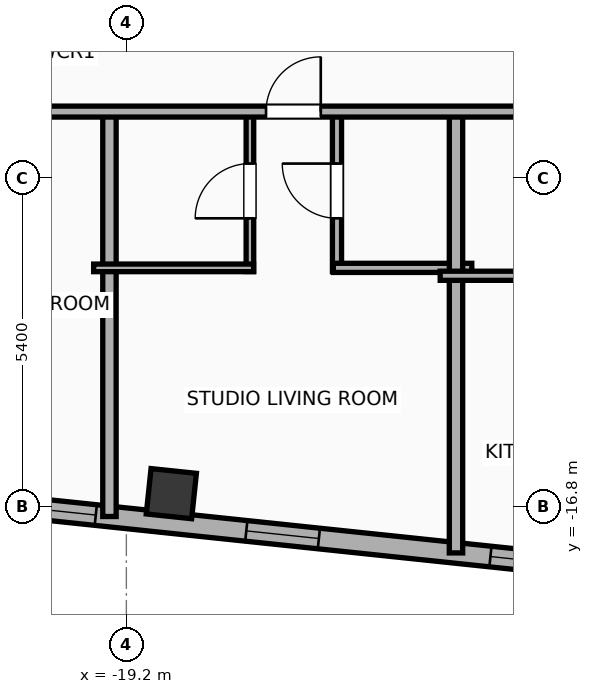
"""IFC4 building model, lengths in metres.
Left out: names, types, materials, properties, quantities, classifications, styles, units other than length and angle.
Written with IfcOpenShell. Run it as: python <this file> out.ifc"""

import sys

from ifc_helpers import new_model, si_unit, direction, frame, frame_2d, origin, origin_2d, place, context, subcontext, project, spatial, rectangle, hollow_rectangle, extrude, element, fill, save


model = new_model("IFC4")
c1 = context("Model", 3, precision=1e-05, world=origin(), true_north=direction((0.0, 1.0)))
c2 = subcontext(c1, "Body", "Model", "MODEL_VIEW")
j1 = project(units=[si_unit("LENGTHUNIT", "METRE"), si_unit("PLANEANGLEUNIT", "RADIAN")], contexts=[c1])
p1 = place(None, origin())
s1 = spatial("IfcSite", under=j1, at=p1, CompositionType="ELEMENT")
p2 = place(p1, origin())
s2 = spatial("IfcBuilding", under=s1, at=p2, CompositionType="ELEMENT")
p3 = place(p2, frame((0.0, 0.0, 267.8)))
s3 = spatial("IfcBuildingStorey", under=s2, at=p3, CompositionType="ELEMENT", Elevation=267.8)
p4 = place(p3, frame((-18.46, -16.583, 0.0), z_axis=(0.0, 0.0, 1.0), x_axis=(0.994521895368, -0.104528463268, 0.0)))
e1 = element("IfcColumn", 1, at=p4, inside=s3, PredefinedType="COLUMN", context=c2, shape_type="SweptSolid", body=[
    extrude(hollow_rectangle(XDim=0.75, YDim=0.75, WallThickness=0.025, at=origin_2d()), origin(), (0.0, 0.0, 1.0), 3.9),
])
p5 = place(p3, frame((18.708, -20.972, 0.0), z_axis=(0.0, 0.0, 1.0), x_axis=(-0.994521888554, 0.104528528102, 0.0)))
e2 = element("IfcWall", 2, at=p5, inside=s3, PredefinedType="ELEMENTEDWALL", context=c2, shape_type="SweptSolid", body=[
    extrude(rectangle(XDim=46.766, YDim=0.34, at=frame_2d((23.383, 0.0))), origin(), (0.0, 0.0, 1.0), 3.65),
])
p6 = place(p5, frame((23.833, 0.0, 0.75)))
e3 = element("IfcOpeningElement", 3, at=p6, cuts=e2, PredefinedType="OPENING", context=c2, shape_type="SweptSolid", body=[
    extrude(rectangle(XDim=2.4, YDim=2.1, at=frame_2d((1.2, 1.05))), frame((0.0, 0.18, 0.0), z_axis=(0.0, -1.0, 0.0), x_axis=(1.0, 0.0, 0.0)), (0.0, 0.0, 1.0), 0.36),
])
p7 = place(p5, frame((38.622, 0.0, 0.75)))
e4 = element("IfcOpeningElement", 4, at=p7, cuts=e2, PredefinedType="OPENING", context=c2, shape_type="SweptSolid", body=[
    extrude(rectangle(XDim=2.4, YDim=2.1, at=frame_2d((1.2, 1.05))), frame((0.0, 0.18, 0.0), z_axis=(0.0, -1.0, 0.0), x_axis=(1.0, 0.0, 0.0)), (0.0, 0.0, 1.0), 0.36),
])
p8 = place(p5, frame((44.402, 0.0, 0.75)))
e5 = element("IfcOpeningElement", 5, at=p8, cuts=e2, PredefinedType="OPENING", context=c2, shape_type="SweptSolid", body=[
    extrude(rectangle(XDim=1.2, YDim=2.05, at=frame_2d((0.6, 1.025))), frame((0.0, 0.18, 0.0), z_axis=(0.0, -1.0, 0.0), x_axis=(1.0, 0.0, 0.0)), (0.0, 0.0, 1.0), 0.36),
])
p9 = place(p5, frame((42.406, 0.0, 0.75)))
e6 = element("IfcOpeningElement", 6, at=p9, cuts=e2, PredefinedType="OPENING", context=c2, shape_type="SweptSolid", body=[
    extrude(rectangle(XDim=1.2, YDim=2.05, at=frame_2d((0.6, 1.025))), frame((0.0, 0.18, 0.0), z_axis=(0.0, -1.0, 0.0), x_axis=(1.0, 0.0, 0.0)), (0.0, 0.0, 1.0), 0.36),
])
p10 = place(p5, frame((34.933, 0.0, 0.75)))
e7 = element("IfcOpeningElement", 7, at=p10, cuts=e2, PredefinedType="OPENING", context=c2, shape_type="SweptSolid", body=[
    extrude(rectangle(XDim=1.2, YDim=2.05, at=frame_2d((0.6, 1.025))), frame((0.0, 0.18, 0.0), z_axis=(0.0, -1.0, 0.0), x_axis=(1.0, 0.0, 0.0)), (0.0, 0.0, 1.0), 0.36),
])
p11 = place(p5, frame((28.631, 0.0, 0.75)))
e8 = element("IfcOpeningElement", 8, at=p11, cuts=e2, PredefinedType="OPENING", context=c2, shape_type="SweptSolid", body=[
    extrude(rectangle(XDim=1.2, YDim=2.05, at=frame_2d((0.6, 1.025))), frame((0.0, 0.18, 0.0), z_axis=(0.0, -1.0, 0.0), x_axis=(1.0, 0.0, 0.0)), (0.0, 0.0, 1.0), 0.36),
])
p12 = place(p5, frame((30.896, 0.0, 0.75)))
e9 = element("IfcOpeningElement", 9, at=p12, cuts=e2, PredefinedType="OPENING", context=c2, shape_type="SweptSolid", body=[
    extrude(rectangle(XDim=1.2, YDim=2.05, at=frame_2d((0.6, 1.025))), frame((0.0, 0.18, 0.0), z_axis=(0.0, -1.0, 0.0), x_axis=(1.0, 0.0, 0.0)), (0.0, 0.0, 1.0), 0.36),
])
p13 = place(p5, frame((7.497, 0.0, 0.75)))
e10 = element("IfcOpeningElement", 10, at=p13, cuts=e2, PredefinedType="OPENING", context=c2, shape_type="SweptSolid", body=[
    extrude(rectangle(XDim=1.2, YDim=2.05, at=frame_2d((0.6, 1.025))), frame((0.0, 0.18, 0.0), z_axis=(0.0, -1.0, 0.0), x_axis=(1.0, 0.0, 0.0)), (0.0, 0.0, 1.0), 0.36),
])
p14 = place(p5, frame((4.151, 0.0, 0.75)))
e11 = element("IfcOpeningElement", 11, at=p14, cuts=e2, PredefinedType="OPENING", context=c2, shape_type="SweptSolid", body=[
    extrude(rectangle(XDim=1.2, YDim=2.05, at=frame_2d((0.6, 1.025))), frame((0.0, 0.18, 0.0), z_axis=(0.0, -1.0, 0.0), x_axis=(1.0, 0.0, 0.0)), (0.0, 0.0, 1.0), 0.36),
])
p15 = place(p5, frame((1.365, 0.0, 0.75)))
e12 = element("IfcOpeningElement", 12, at=p15, cuts=e2, PredefinedType="OPENING", context=c2, shape_type="SweptSolid", body=[
    extrude(rectangle(XDim=1.2, YDim=2.05, at=frame_2d((0.6, 1.025))), frame((0.0, 0.18, 0.0), z_axis=(0.0, -1.0, 0.0), x_axis=(1.0, 0.0, 0.0)), (0.0, 0.0, 1.0), 0.36),
])
p16 = place(p5, frame((20.254, 0.0, 0.75)))
e13 = element("IfcOpeningElement", 13, at=p16, cuts=e2, PredefinedType="OPENING", context=c2, shape_type="SweptSolid", body=[
    extrude(rectangle(XDim=1.2, YDim=2.05, at=frame_2d((0.6, 1.025))), frame((0.0, 0.18, 0.0), z_axis=(0.0, -1.0, 0.0), x_axis=(1.0, 0.0, 0.0)), (0.0, 0.0, 1.0), 0.36),
])
p17 = place(p5, frame((16.172, 0.0, 0.75)))
e14 = element("IfcOpeningElement", 14, at=p17, cuts=e2, PredefinedType="OPENING", context=c2, shape_type="SweptSolid", body=[
    extrude(rectangle(XDim=1.2, YDim=2.05, at=frame_2d((0.6, 1.025))), frame((0.0, 0.18, 0.0), z_axis=(0.0, -1.0, 0.0), x_axis=(1.0, 0.0, 0.0)), (0.0, 0.0, 1.0), 0.36),
])
p18 = place(p5, frame((12.11, 0.0, 0.75)))
e15 = element("IfcOpeningElement", 15, at=p18, cuts=e2, PredefinedType="OPENING", context=c2, shape_type="SweptSolid", body=[
    extrude(rectangle(XDim=1.2, YDim=2.05, at=frame_2d((0.6, 1.025))), frame((0.0, 0.18, 0.0), z_axis=(0.0, -1.0, 0.0), x_axis=(1.0, 0.0, 0.0)), (0.0, 0.0, 1.0), 0.36),
])
p19 = place(p3, frame((-19.478, -16.959, 0.0), z_axis=(0.0, 0.0, 1.0), x_axis=(0.0, 1.0, 0.0)))
e16 = element("IfcWall", 16, at=p19, inside=s3, PredefinedType="PARTITIONING", context=c2, shape_type="SweptSolid", body=[
    extrude(rectangle(XDim=6.739, YDim=0.22, at=frame_2d((3.369, 0.0))), origin(), (0.0, 0.0, 1.0), 3.65),
])
p20 = place(p3, frame((-17.168, -12.93, 0.0), z_axis=(0.0, 0.0, 1.0), x_axis=(0.0, 1.0, 0.0)))
e17 = element("IfcWall", 17, at=p20, inside=s3, PredefinedType="PARTITIONING", context=c2, shape_type="SweptSolid", body=[
    extrude(rectangle(XDim=2.65, YDim=0.125, at=frame_2d((1.325, 0.0))), origin(), (0.0, 0.0, 1.0), 3.65),
])
p21 = place(p20, frame((0.875, 0.0, 0.0)))
e18 = element("IfcOpeningElement", 18, at=p21, cuts=e17, PredefinedType="OPENING", context=c2, shape_type="SweptSolid", body=[
    extrude(rectangle(XDim=0.9, YDim=2.05, at=frame_2d((0.45, 1.025))), frame((0.0, 0.073, 0.0), z_axis=(0.0, -1.0, 0.0), x_axis=(1.0, 0.0, 0.0)), (0.0, 0.0, 1.0), 0.145),
])
p22 = place(p3, frame((-15.736, -12.93, 0.0), z_axis=(0.0, 0.0, 1.0), x_axis=(0.0, 1.0, 0.0)))
e19 = element("IfcWall", 19, at=p22, inside=s3, PredefinedType="PLUMBINGWALL", context=c2, shape_type="SweptSolid", body=[
    extrude(rectangle(XDim=2.65, YDim=0.15, at=frame_2d((1.325, 0.0))), origin(), (0.0, 0.0, 1.0), 3.65),
])
p23 = place(p22, frame((0.875, 0.0, 0.0)))
e20 = element("IfcOpeningElement", 20, at=p23, cuts=e19, PredefinedType="OPENING", context=c2, shape_type="SweptSolid", body=[
    extrude(rectangle(XDim=0.9, YDim=2.05, at=frame_2d((0.45, 1.025))), frame((0.0, 0.085, 0.0), z_axis=(0.0, -1.0, 0.0), x_axis=(1.0, 0.0, 0.0)), (0.0, 0.0, 1.0), 0.17),
])
p24 = place(p3, frame((-19.738, -12.87, 0.0), z_axis=(0.0, 0.0, 1.0), x_axis=(1.0, 0.0, 0.0)))
e21 = element("IfcWall", 21, at=p24, inside=s3, PredefinedType="PARTITIONING", context=c2, shape_type="SweptSolid", body=[
    extrude(rectangle(XDim=2.63, YDim=0.125, at=frame_2d((1.315, 0.0))), origin(), (0.0, 0.0, 1.0), 3.65),
])
p25 = place(p3, frame((-15.796, -12.87, 0.0), z_axis=(0.0, 0.0, 1.0), x_axis=(1.0, 0.0, 0.0)))
e22 = element("IfcWall", 22, at=p25, inside=s3, PredefinedType="PLUMBINGWALL", context=c2, shape_type="SweptSolid", body=[
    extrude(rectangle(XDim=2.277, YDim=0.15, at=frame_2d((1.138, 0.0))), origin(), (0.0, 0.0, 1.0), 3.65),
])
p26 = place(p3, frame((-13.779, -17.558, 0.0), z_axis=(0.0, 0.0, 1.0), x_axis=(0.0, 1.0, 0.0)))
e23 = element("IfcWall", 23, at=p26, inside=s3, PredefinedType="PARTITIONING", context=c2, shape_type="SweptSolid", body=[
    extrude(rectangle(XDim=7.338, YDim=0.22, at=frame_2d((3.669, 0.0))), origin(), (0.0, 0.0, 1.0), 3.65),
])
p27 = place(p3, frame((-14.039, -13.0, 0.0), z_axis=(0.0, 0.0, 1.0), x_axis=(1.0, 0.0, 0.0)))
e24 = element("IfcWall", 24, at=p27, inside=s3, PredefinedType="PLUMBINGWALL", context=c2, shape_type="SweptSolid", body=[
    extrude(rectangle(XDim=2.671, YDim=0.15, at=frame_2d((1.335, 0.0))), origin(), (0.0, 0.0, 1.0), 3.65),
])
p28 = place(p3, frame((-30.66, -10.3, 0.0), z_axis=(0.0, 0.0, 1.0), x_axis=(1.0, 0.0, 0.0)))
e25 = element("IfcWall", 25, at=p28, inside=s3, PredefinedType="PARTITIONING", context=c2, shape_type="SweptSolid", body=[
    extrude(rectangle(XDim=22.58, YDim=0.18, at=frame_2d((11.29, 0.0))), origin(), (0.0, 0.0, 1.0), 3.65),
])
p29 = place(p28, frame((2.318, 0.0, 0.0)))
e26 = element("IfcOpeningElement", 26, at=p29, cuts=e25, PredefinedType="OPENING", context=c2, shape_type="SweptSolid", body=[
    extrude(rectangle(XDim=0.9, YDim=2.05, at=frame_2d((0.45, 1.025))), frame((0.0, 0.1, 0.0), z_axis=(0.0, -1.0, 0.0), x_axis=(1.0, 0.0, 0.0)), (0.0, 0.0, 1.0), 0.2),
])
p30 = place(p28, frame((8.845, 0.0, 0.0)))
e27 = element("IfcOpeningElement", 27, at=p30, cuts=e25, PredefinedType="OPENING", context=c2, shape_type="SweptSolid", body=[
    extrude(rectangle(XDim=1.15, YDim=2.05, at=frame_2d((0.575, 1.025))), frame((0.0, 0.1, 0.0), z_axis=(0.0, -1.0, 0.0), x_axis=(1.0, 0.0, 0.0)), (0.0, 0.0, 1.0), 0.2),
])
p31 = place(p28, frame((13.758, 0.0, 0.0)))
e28 = element("IfcOpeningElement", 28, at=p31, cuts=e25, PredefinedType="OPENING", context=c2, shape_type="SweptSolid", body=[
    extrude(rectangle(XDim=0.9, YDim=2.05, at=frame_2d((0.45, 1.025))), frame((0.0, 0.1, 0.0), z_axis=(0.0, -1.0, 0.0), x_axis=(1.0, 0.0, 0.0)), (0.0, 0.0, 1.0), 0.2),
])
p32 = place(p28, frame((20.292, 0.0, 0.0)))
e29 = element("IfcOpeningElement", 29, at=p32, cuts=e25, PredefinedType="OPENING", context=c2, shape_type="SweptSolid", body=[
    extrude(rectangle(XDim=1.15, YDim=2.05, at=frame_2d((0.575, 1.025))), frame((0.0, 0.1, 0.0), z_axis=(0.0, -1.0, 0.0), x_axis=(1.0, 0.0, 0.0)), (0.0, 0.0, 1.0), 0.2),
])
p33 = place(p7, origin())
e30 = element("IfcWindow", 30, at=p33, inside=s3, PartitioningType="SINGLE_PANEL", PredefinedType="WINDOW", context=c2, shape_type="SweptSolid", body=[
    extrude(rectangle(XDim=2.4, YDim=2.1, at=frame_2d((1.2, 1.05))), frame((0.0, 0.03, 0.0), z_axis=(0.0, -1.0, 0.0), x_axis=(1.0, 0.0, 0.0)), (0.0, 0.0, 1.0), 0.06),
])
fill(e4, e30)
p34 = place(p10, origin())
e31 = element("IfcWindow", 31, at=p34, inside=s3, PartitioningType="SINGLE_PANEL", PredefinedType="WINDOW", context=c2, shape_type="SweptSolid", body=[
    extrude(rectangle(XDim=1.2, YDim=2.05, at=frame_2d((0.6, 1.025))), frame((0.0, 0.03, 0.0), z_axis=(0.0, -1.0, 0.0), x_axis=(1.0, 0.0, 0.0)), (0.0, 0.0, 1.0), 0.06),
])
fill(e7, e31)
p35 = place(p12, origin())
e32 = element("IfcWindow", 32, at=p35, inside=s3, PartitioningType="SINGLE_PANEL", PredefinedType="WINDOW", context=c2, shape_type="SweptSolid", body=[
    extrude(rectangle(XDim=1.2, YDim=2.05, at=frame_2d((0.6, 1.025))), frame((0.0, 0.03, 0.0), z_axis=(0.0, -1.0, 0.0), x_axis=(1.0, 0.0, 0.0)), (0.0, 0.0, 1.0), 0.06),
])
fill(e9, e32)
p36 = place(p21, origin())
e33 = element("IfcDoor", 33, at=p36, inside=s3, OperationType="SINGLE_SWING_LEFT", PredefinedType="DOOR", context=c2, shape_type="SweptSolid", body=[
    extrude(rectangle(XDim=0.9, YDim=2.05, at=frame_2d((0.45, 1.025))), frame((0.0, 0.025, 0.0), z_axis=(0.0, -1.0, 0.0), x_axis=(1.0, 0.0, 0.0)), (0.0, 0.0, 1.0), 0.05),
])
fill(e18, e33)
p37 = place(p23, origin())
e34 = element("IfcDoor", 34, at=p37, inside=s3, OperationType="SINGLE_SWING_RIGHT", PredefinedType="DOOR", context=c2, shape_type="SweptSolid", body=[
    extrude(rectangle(XDim=0.9, YDim=2.05, at=frame_2d((0.45, 1.025))), frame((0.0, 0.025, 0.0), z_axis=(0.0, -1.0, 0.0), x_axis=(1.0, 0.0, 0.0)), (0.0, 0.0, 1.0), 0.05),
])
fill(e20, e34)
p38 = place(p31, origin())
e35 = element("IfcDoor", 35, at=p38, inside=s3, OperationType="SINGLE_SWING_RIGHT", PredefinedType="DOOR", context=c2, shape_type="SweptSolid", body=[
    extrude(rectangle(XDim=0.9, YDim=2.05, at=frame_2d((0.45, 1.025))), frame((0.0, 0.025, 0.0), z_axis=(0.0, -1.0, 0.0), x_axis=(1.0, 0.0, 0.0)), (0.0, 0.0, 1.0), 0.05),
])
fill(e28, e35)
save(model, sys.argv[1])
